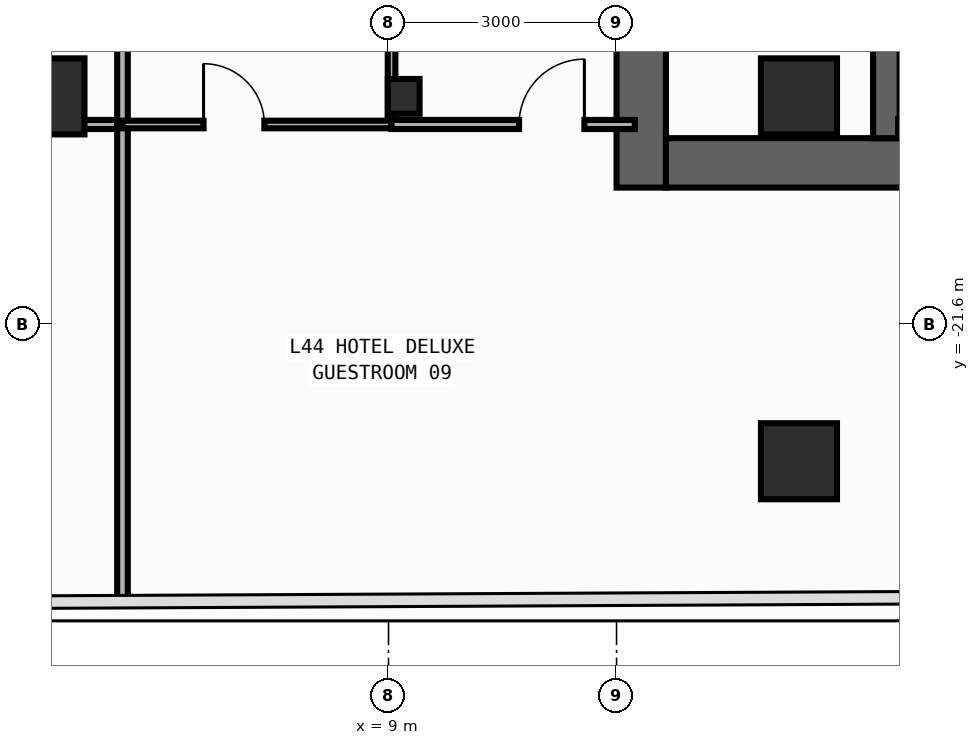
"""IFC4 building model, lengths in metres.
Left out: names, types, materials, properties, quantities, classifications, styles, units other than length and angle.
Written with IfcOpenShell. Run it as: python <this file> out.ifc"""

import sys

from ifc_helpers import new_model, si_unit, direction, frame, frame_2d, origin, origin_2d, place, context, subcontext, project, spatial, rectangle, i_section, extrude, element, fill, save


model = new_model("IFC4")
c1 = context("Model", 3, precision=1e-05, world=origin(), true_north=direction((0.0, 1.0)))
c2 = subcontext(c1, "Body", "Model", "MODEL_VIEW")
j1 = project(units=[si_unit("LENGTHUNIT", "METRE"), si_unit("PLANEANGLEUNIT", "RADIAN")], contexts=[c1])
p1 = place(None, origin())
s1 = spatial("IfcSite", under=j1, at=p1, CompositionType="ELEMENT")
p2 = place(p1, origin())
s2 = spatial("IfcBuilding", under=s1, at=p2, CompositionType="ELEMENT")
p3 = place(p2, frame((0.0, 0.0, 191.6)))
s3 = spatial("IfcBuildingStorey", under=s2, at=p3, CompositionType="ELEMENT", Elevation=191.6)
p4 = place(p3, frame((12.325, -19.8, 0.0), z_axis=(0.0, 0.0, 1.0), x_axis=(0.0, 1.0, 0.0)))
e1 = element("IfcWall", 1, at=p4, inside=s3, PredefinedType="SHEAR", context=c2, shape_type="SweptSolid", body=[
    extrude(rectangle(XDim=27.0, YDim=0.65, at=frame_2d((13.5, 0.0))), origin(), (0.0, 0.0, 1.0), 3.54),
])
p5 = place(p4, frame((23.05, 0.0, 0.0)))
e2 = element("IfcOpeningElement", 2, at=p5, cuts=e1, PredefinedType="OPENING", context=c2, shape_type="SweptSolid", body=[
    extrude(rectangle(XDim=1.1, YDim=2.2, at=frame_2d((0.55, 1.1))), frame((0.0, 0.335, 0.0), z_axis=(0.0, -1.0, 0.0), x_axis=(1.0, 0.0, 0.0)), (0.0, 0.0, 1.0), 0.67),
])
p6 = place(p4, frame((19.85, 0.0, 0.0)))
e3 = element("IfcOpeningElement", 3, at=p6, cuts=e1, PredefinedType="OPENING", context=c2, shape_type="SweptSolid", body=[
    extrude(rectangle(XDim=1.1, YDim=2.2, at=frame_2d((0.55, 1.1))), frame((0.0, 0.335, 0.0), z_axis=(0.0, -1.0, 0.0), x_axis=(1.0, 0.0, 0.0)), (0.0, 0.0, 1.0), 0.67),
])
p7 = place(p4, frame((16.65, 0.0, 0.0)))
e4 = element("IfcOpeningElement", 4, at=p7, cuts=e1, PredefinedType="OPENING", context=c2, shape_type="SweptSolid", body=[
    extrude(rectangle(XDim=1.1, YDim=2.2, at=frame_2d((0.55, 1.1))), frame((0.0, 0.335, 0.0), z_axis=(0.0, -1.0, 0.0), x_axis=(1.0, 0.0, 0.0)), (0.0, 0.0, 1.0), 0.67),
])
p8 = place(p4, frame((7.175, 0.0, 0.0)))
e5 = element("IfcOpeningElement", 5, at=p8, cuts=e1, PredefinedType="OPENING", context=c2, shape_type="SweptSolid", body=[
    extrude(rectangle(XDim=0.85, YDim=2.1, at=frame_2d((0.425, 1.05))), frame((0.0, 0.335, 0.0), z_axis=(0.0, -1.0, 0.0), x_axis=(1.0, 0.0, 0.0)), (0.0, 0.0, 1.0), 0.67),
])
p9 = place(p4, frame((10.375, 0.0, 0.0)))
e6 = element("IfcOpeningElement", 6, at=p9, cuts=e1, PredefinedType="OPENING", context=c2, shape_type="SweptSolid", body=[
    extrude(rectangle(XDim=0.85, YDim=2.1, at=frame_2d((0.425, 1.05))), frame((0.0, 0.335, 0.0), z_axis=(0.0, -1.0, 0.0), x_axis=(1.0, 0.0, 0.0)), (0.0, 0.0, 1.0), 0.67),
])
p10 = place(p4, frame((12.725, 0.0, 0.0)))
e7 = element("IfcOpeningElement", 7, at=p10, cuts=e1, PredefinedType="OPENING", context=c2, shape_type="SweptSolid", body=[
    extrude(rectangle(XDim=1.15, YDim=2.2, at=frame_2d((0.575, 1.1))), frame((0.0, 0.335, 0.0), z_axis=(0.0, -1.0, 0.0), x_axis=(1.0, 0.0, 0.0)), (0.0, 0.0, 1.0), 0.67),
])
p11 = place(p4, frame((25.125, 0.0, 0.0)))
e8 = element("IfcOpeningElement", 8, at=p11, cuts=e1, PredefinedType="OPENING", context=c2, shape_type="SweptSolid", body=[
    extrude(rectangle(XDim=0.85, YDim=2.1, at=frame_2d((0.425, 1.05))), frame((0.0, 0.335, 0.0), z_axis=(0.0, -1.0, 0.0), x_axis=(1.0, 0.0, 0.0)), (0.0, 0.0, 1.0), 0.67),
])
p12 = place(p3, frame((12.65, -19.475, 0.0), z_axis=(0.0, 0.0, 1.0), x_axis=(1.0, 0.0, 0.0)))
e9 = element("IfcWall", 9, at=p12, inside=s3, PredefinedType="SHEAR", context=c2, shape_type="SweptSolid", body=[
    extrude(rectangle(XDim=7.1, YDim=0.65, at=frame_2d((3.55, 0.0))), origin(), (0.0, 0.0, 1.0), 3.54),
])
p13 = place(p3, frame((15.55, -19.15, 0.0), z_axis=(0.0, 0.0, 1.0), x_axis=(0.0, 1.0, 0.0)))
e10 = element("IfcWall", 10, at=p13, inside=s3, PredefinedType="SHEAR", context=c2, shape_type="SweptSolid", body=[
    extrude(rectangle(XDim=25.7, YDim=0.35, at=frame_2d((12.85, 0.0))), origin(), (0.0, 0.0, 1.0), 3.54),
])
p14 = place(p13, frame((12.075, 0.0, 0.0)))
e11 = element("IfcOpeningElement", 11, at=p14, cuts=e10, PredefinedType="OPENING", context=c2, shape_type="SweptSolid", body=[
    extrude(rectangle(XDim=1.15, YDim=2.2, at=frame_2d((0.575, 1.1))), frame((0.0, 0.185, 0.0), z_axis=(0.0, -1.0, 0.0), x_axis=(1.0, 0.0, 0.0)), (0.0, 0.0, 1.0), 0.37),
])
p15 = place(p13, frame((24.475, 0.0, 0.0)))
e12 = element("IfcOpeningElement", 12, at=p15, cuts=e10, PredefinedType="OPENING", context=c2, shape_type="SweptSolid", body=[
    extrude(rectangle(XDim=0.85, YDim=2.1, at=frame_2d((0.425, 1.05))), frame((0.0, 0.185, 0.0), z_axis=(0.0, -1.0, 0.0), x_axis=(1.0, 0.0, 0.0)), (0.0, 0.0, 1.0), 0.37),
])
p16 = place(p3, frame((15.705, -19.01, 0.0), z_axis=(0.0, 0.0, 1.0), x_axis=(1.0, 0.0, 0.0)))
e13 = element("IfcWall", 13, at=p16, inside=s3, PredefinedType="SHEAR", context=c2, shape_type="SweptSolid", body=[
    extrude(rectangle(XDim=4.065, YDim=0.22, at=frame_2d((2.032, 0.0))), origin(), (0.0, 0.0, 1.0), 3.54),
])
p17 = place(p3, frame((9.2, -18.6, 0.0), z_axis=(0.0, 0.0, 1.0), x_axis=(1.0, 0.0, 0.0)))
e14 = element("IfcColumn", 14, at=p17, inside=s3, PredefinedType="COLUMN", context=c2, shape_type="SweptSolid", body=[
    extrude(i_section(OverallWidth=0.417, OverallDepth=0.458, WebThickness=0.03, FlangeThickness=0.05, FilletRadius=0.022, at=origin_2d()), origin(), (0.0, 0.0, 1.0), 3.8),
])
for number, where, z_axis, x_axis in (
    (15, (14.4, -18.6, 0.0), (0.0, 0.0, 1.0), (1.0, 0.0, 0.0)),
    (16, (4.5, -18.6, 0.0), (0.0, 0.0, 1.0), (1.0, 0.0, 0.0)),
    (17, (14.4, -23.4, 0.0), (0.0, 0.0, 1.0), (1.0, 0.0, 0.0)),
):
    element("IfcColumn", number, at=place(p3, frame(where, z_axis=z_axis, x_axis=x_axis)), inside=s3, PredefinedType="COLUMN", context=c2, shape_type="SweptSolid", body=[
        extrude(rectangle(XDim=1.0, YDim=1.0, at=origin_2d()), origin(), (0.0, 0.0, 1.0), 3.8),
    ])
p18 = place(p3, frame((0.476, -18.97, 0.0), z_axis=(0.0, 0.0, 1.0), x_axis=(1.0, 0.0, 0.0)))
e18 = element("IfcWall", 18, at=p18, inside=s3, PredefinedType="PARTITIONING", context=c2, shape_type="SweptSolid", body=[
    extrude(rectangle(XDim=5.024, YDim=0.12, at=frame_2d((2.512, 0.0))), origin(), (0.0, 0.0, 1.0), 3.54),
])
p19 = place(p18, frame((1.271, 0.0, 0.0)))
e19 = element("IfcOpeningElement", 19, at=p19, cuts=e18, PredefinedType="OPENING", context=c2, shape_type="SweptSolid", body=[
    extrude(rectangle(XDim=0.86, YDim=2.15, at=frame_2d((0.43, 1.075))), frame((0.0, 0.07, 0.0), z_axis=(0.0, -1.0, 0.0), x_axis=(1.0, 0.0, 0.0)), (0.0, 0.0, 1.0), 0.14),
])
p20 = place(p3, frame((5.5, -18.97, 0.0), z_axis=(0.0, 0.0, 1.0), x_axis=(0.0, 1.0, 0.0)))
e20 = element("IfcWall", 20, at=p20, inside=s3, PredefinedType="PARTITIONING", context=c2, shape_type="SweptSolid", body=[
    extrude(rectangle(XDim=3.015, YDim=0.14, at=frame_2d((1.507, 0.0))), origin(), (0.0, 0.0, 1.0), 3.54),
])
p21 = place(p3, frame((5.5, -25.243, 0.0), z_axis=(0.0, 0.0, 1.0), x_axis=(0.0, 1.0, 0.0)))
e21 = element("IfcWall", 21, at=p21, inside=s3, PredefinedType="PARTITIONING", context=c2, shape_type="SweptSolid", body=[
    extrude(rectangle(XDim=6.273, YDim=0.14, at=frame_2d((3.136, 0.0))), origin(), (0.0, 0.0, 1.0), 3.54),
])
p22 = place(p3, frame((9.04, -18.92, 0.0), z_axis=(0.0, 0.0, 1.0), x_axis=(0.0, 1.0, 0.0)))
e22 = element("IfcWall", 22, at=p22, inside=s3, PredefinedType="PARTITIONING", context=c2, shape_type="SweptSolid", body=[
    extrude(rectangle(XDim=2.965, YDim=0.1, at=frame_2d((1.482, 0.0))), origin(), (0.0, 0.0, 1.0), 2.952),
])
p23 = place(p22, frame((1.705, 0.0, 0.0)))
e23 = element("IfcOpeningElement", 23, at=p23, cuts=e22, PredefinedType="OPENING", context=c2, shape_type="SweptSolid", body=[
    extrude(rectangle(XDim=0.8, YDim=2.1, at=frame_2d((0.4, 1.05))), frame((0.0, 0.06, 0.0), z_axis=(0.0, -1.0, 0.0), x_axis=(1.0, 0.0, 0.0)), (0.0, 0.0, 1.0), 0.12),
])
p24 = place(p3, frame((5.5, -18.97, 0.0), z_axis=(0.0, 0.0, 1.0), x_axis=(1.0, 0.0, 0.0)))
e24 = element("IfcWall", 24, at=p24, inside=s3, PredefinedType="PARTITIONING", context=c2, shape_type="SweptSolid", body=[
    extrude(rectangle(XDim=3.54, YDim=0.1, at=frame_2d((1.77, 0.0))), origin(), (0.0, 0.0, 1.0), 3.54),
])
p25 = place(p24, frame((1.067, 0.0, 0.0)))
e25 = element("IfcOpeningElement", 25, at=p25, cuts=e24, PredefinedType="OPENING", context=c2, shape_type="SweptSolid", body=[
    extrude(rectangle(XDim=0.8, YDim=2.1, at=frame_2d((0.4, 1.05))), frame((0.0, 0.06, 0.0), z_axis=(0.0, -1.0, 0.0), x_axis=(1.0, 0.0, 0.0)), (0.0, 0.0, 1.0), 0.12),
])
p26 = place(p3, frame((9.04, -18.97, 0.0), z_axis=(0.0, 0.0, 1.0), x_axis=(1.0, 0.0, 0.0)))
e26 = element("IfcWall", 26, at=p26, inside=s3, PredefinedType="PARTITIONING", context=c2, shape_type="SweptSolid", body=[
    extrude(rectangle(XDim=3.2, YDim=0.12, at=frame_2d((1.6, 0.0))), origin(), (0.0, 0.0, 1.0), 3.54),
])
p27 = place(p26, frame((1.677, 0.0, 0.0)))
e27 = element("IfcOpeningElement", 27, at=p27, cuts=e26, PredefinedType="OPENING", context=c2, shape_type="SweptSolid", body=[
    extrude(rectangle(XDim=0.86, YDim=2.15, at=frame_2d((0.43, 1.075))), frame((0.0, 0.07, 0.0), z_axis=(0.0, -1.0, 0.0), x_axis=(1.0, 0.0, 0.0)), (0.0, 0.0, 1.0), 0.14),
])
p28 = place(p25, origin())
e28 = element("IfcDoor", 28, at=p28, inside=s3, OperationType="SINGLE_SWING_LEFT", PredefinedType="DOOR", context=c2, shape_type="SweptSolid", body=[
    extrude(rectangle(XDim=0.8, YDim=2.1, at=frame_2d((0.4, 1.05))), frame((0.0, 0.025, 0.0), z_axis=(0.0, -1.0, 0.0), x_axis=(1.0, 0.0, 0.0)), (0.0, 0.0, 1.0), 0.05),
])
fill(e25, e28)
p29 = place(p27, origin())
e29 = element("IfcDoor", 29, at=p29, inside=s3, OperationType="SINGLE_SWING_RIGHT", PredefinedType="DOOR", context=c2, shape_type="SweptSolid", body=[
    extrude(rectangle(XDim=0.86, YDim=2.15, at=frame_2d((0.43, 1.075))), frame((0.0, 0.025, 0.0), z_axis=(0.0, -1.0, 0.0), x_axis=(1.0, 0.0, 0.0)), (0.0, 0.0, 1.0), 0.05),
])
fill(e27, e29)
save(model, sys.argv[1])
